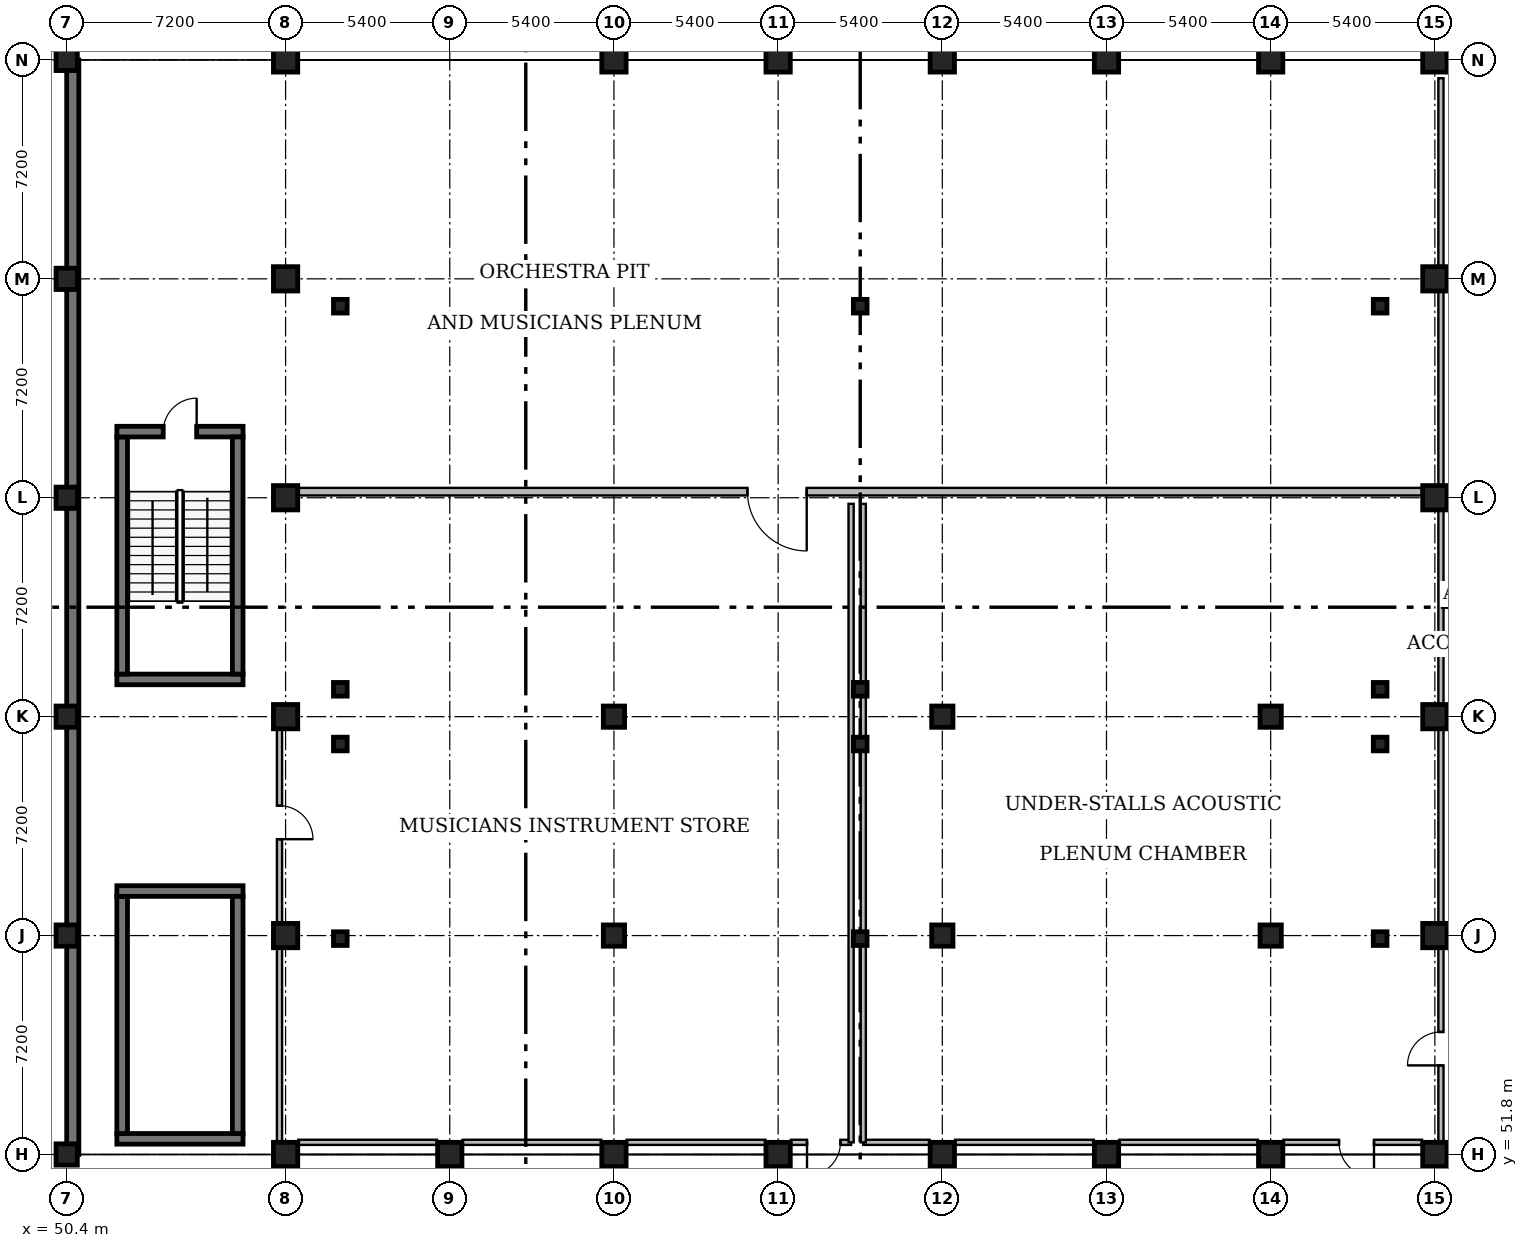
"""IFC4 building model, lengths in metres.
Left out: names, types, materials, properties, quantities, classifications, styles, units other than length and angle.
Written with IfcOpenShell. Run it as: python <this file> out.ifc"""

import sys

from ifc_helpers import new_model, si_unit, direction, frame, frame_2d, origin, origin_2d, place, context, subcontext, project, spatial, rectangle, extrude, element, fill, save


model = new_model("IFC4")
c1 = context("Model", 3, precision=1e-05, world=origin(), true_north=direction((0.0, 1.0)))
c2 = subcontext(c1, "Body", "Model", "MODEL_VIEW")
j1 = project(units=[si_unit("LENGTHUNIT", "METRE"), si_unit("PLANEANGLEUNIT", "RADIAN")], contexts=[c1])
p1 = place(None, origin())
s1 = spatial("IfcSite", under=j1, at=p1, CompositionType="ELEMENT")
p2 = place(p1, origin())
s2 = spatial("IfcBuilding", under=s1, at=p2, CompositionType="ELEMENT")
p3 = place(p2, frame((0.0, 0.0, -4.8)))
s3 = spatial("IfcBuildingStorey", under=s2, at=p3, CompositionType="ELEMENT", Elevation=-4.8)
p4 = place(p3, frame((68.4, 51.8, 0.0), z_axis=(0.0, 0.0, 1.0), x_axis=(1.0, 0.0, 0.0)))
e1 = element("IfcColumn", 1, at=p4, inside=s3, PredefinedType="COLUMN", context=c2, shape_type="SweptSolid", body=[
    extrude(rectangle(XDim=0.8, YDim=0.8, at=origin_2d()), origin(), (0.0, 0.0, 1.0), 4.8),
])
for number, where, z_axis, x_axis in (
    (2, (68.4, 59.0, 0.0), (0.0, 0.0, 1.0), (1.0, 0.0, 0.0)),
    (3, (68.4, 66.2, 0.0), (0.0, 0.0, 1.0), (1.0, 0.0, 0.0)),
):
    element("IfcColumn", number, at=place(p3, frame(where, z_axis=z_axis, x_axis=x_axis)), inside=s3, PredefinedType="COLUMN", context=c2, shape_type="SweptSolid", body=[
        extrude(rectangle(XDim=0.7, YDim=0.7, at=origin_2d()), origin(), (0.0, 0.0, 1.0), 4.8),
    ])
for number, where, z_axis, x_axis in (
    (4, (68.4, 87.8, 0.0), (0.0, 0.0, 1.0), (1.0, 0.0, 0.0)),
    (5, (73.8, 51.8, 0.0), (0.0, 0.0, 1.0), (1.0, 0.0, 0.0)),
    (6, (73.8, 87.8, 0.0), (0.0, 0.0, 1.0), (1.0, 0.0, 0.0)),
    (7, (79.2, 51.8, 0.0), (0.0, 0.0, 1.0), (1.0, 0.0, 0.0)),
):
    element("IfcColumn", number, at=place(p3, frame(where, z_axis=z_axis, x_axis=x_axis)), inside=s3, PredefinedType="COLUMN", context=c2, shape_type="SweptSolid", body=[
        extrude(rectangle(XDim=0.8, YDim=0.8, at=origin_2d()), origin(), (0.0, 0.0, 1.0), 4.8),
    ])
for number, where, z_axis, x_axis in (
    (8, (79.2, 59.0, 0.0), (0.0, 0.0, 1.0), (1.0, 0.0, 0.0)),
    (9, (79.2, 66.2, 0.0), (0.0, 0.0, 1.0), (1.0, 0.0, 0.0)),
):
    element("IfcColumn", number, at=place(p3, frame(where, z_axis=z_axis, x_axis=x_axis)), inside=s3, PredefinedType="COLUMN", context=c2, shape_type="SweptSolid", body=[
        extrude(rectangle(XDim=0.7, YDim=0.7, at=origin_2d()), origin(), (0.0, 0.0, 1.0), 4.8),
    ])
for number, where, z_axis, x_axis in (
    (10, (79.2, 87.8, 0.0), (0.0, 0.0, 1.0), (1.0, 0.0, 0.0)),
    (11, (84.6, 51.8, 0.0), (0.0, 0.0, 1.0), (1.0, 0.0, 0.0)),
    (12, (84.6, 87.8, 0.0), (0.0, 0.0, 1.0), (1.0, 0.0, 0.0)),
    (13, (90.0, 51.8, 0.0), (0.0, 0.0, 1.0), (1.0, 0.0, 0.0)),
):
    element("IfcColumn", number, at=place(p3, frame(where, z_axis=z_axis, x_axis=x_axis)), inside=s3, PredefinedType="COLUMN", context=c2, shape_type="SweptSolid", body=[
        extrude(rectangle(XDim=0.8, YDim=0.8, at=origin_2d()), origin(), (0.0, 0.0, 1.0), 4.8),
    ])
for number, where, z_axis, x_axis in (
    (14, (90.0, 59.0, 0.0), (0.0, 0.0, 1.0), (1.0, 0.0, 0.0)),
    (15, (90.0, 66.2, 0.0), (0.0, 0.0, 1.0), (1.0, 0.0, 0.0)),
):
    element("IfcColumn", number, at=place(p3, frame(where, z_axis=z_axis, x_axis=x_axis)), inside=s3, PredefinedType="COLUMN", context=c2, shape_type="SweptSolid", body=[
        extrude(rectangle(XDim=0.7, YDim=0.7, at=origin_2d()), origin(), (0.0, 0.0, 1.0), 4.8),
    ])
for number, where, z_axis, x_axis in (
    (16, (90.0, 87.8, 0.0), (0.0, 0.0, 1.0), (1.0, 0.0, 0.0)),
    (17, (95.4, 51.8, 0.0), (0.0, 0.0, 1.0), (1.0, 0.0, 0.0)),
    (18, (95.4, 59.0, 0.0), (0.0, 0.0, 1.0), (1.0, 0.0, 0.0)),
    (19, (95.4, 66.2, 0.0), (0.0, 0.0, 1.0), (1.0, 0.0, 0.0)),
    (20, (95.4, 73.4, 0.0), (0.0, 0.0, 1.0), (1.0, 0.0, 0.0)),
    (21, (95.4, 80.6, 0.0), (0.0, 0.0, 1.0), (1.0, 0.0, 0.0)),
    (22, (95.4, 87.8, 0.0), (0.0, 0.0, 1.0), (1.0, 0.0, 0.0)),
):
    element("IfcColumn", number, at=place(p3, frame(where, z_axis=z_axis, x_axis=x_axis)), inside=s3, PredefinedType="COLUMN", context=c2, shape_type="SweptSolid", body=[
        extrude(rectangle(XDim=0.8, YDim=0.8, at=origin_2d()), origin(), (0.0, 0.0, 1.0), 4.8),
    ])
for number, where, z_axis, x_axis in (
    (23, (50.4, 51.8, 0.0), (0.0, 0.0, 1.0), (1.0, 0.0, 0.0)),
    (24, (50.4, 59.0, 0.0), (0.0, 0.0, 1.0), (1.0, 0.0, 0.0)),
    (25, (50.4, 66.2, 0.0), (0.0, 0.0, 1.0), (1.0, 0.0, 0.0)),
    (26, (50.4, 73.4, 0.0), (0.0, 0.0, 1.0), (1.0, 0.0, 0.0)),
    (27, (50.4, 80.6, 0.0), (0.0, 0.0, 1.0), (1.0, 0.0, 0.0)),
    (28, (50.4, 87.8, 0.0), (0.0, 0.0, 1.0), (1.0, 0.0, 0.0)),
):
    element("IfcColumn", number, at=place(p3, frame(where, z_axis=z_axis, x_axis=x_axis)), inside=s3, PredefinedType="COLUMN", context=c2, shape_type="SweptSolid", body=[
        extrude(rectangle(XDim=0.7, YDim=0.7, at=origin_2d()), origin(), (0.0, 0.0, 1.0), 4.8),
    ])
for number, where, z_axis, x_axis in (
    (29, (57.6, 51.8, 0.0), (0.0, 0.0, 1.0), (1.0, 0.0, 0.0)),
    (30, (57.6, 59.0, 0.0), (0.0, 0.0, 1.0), (1.0, 0.0, 0.0)),
    (31, (57.6, 66.2, 0.0), (0.0, 0.0, 1.0), (1.0, 0.0, 0.0)),
    (32, (57.6, 73.4, 0.0), (0.0, 0.0, 1.0), (1.0, 0.0, 0.0)),
    (33, (57.6, 80.6, 0.0), (0.0, 0.0, 1.0), (1.0, 0.0, 0.0)),
    (34, (57.6, 87.8, 0.0), (0.0, 0.0, 1.0), (1.0, 0.0, 0.0)),
    (35, (63.0, 51.8, 0.0), (0.0, 0.0, 1.0), (1.0, 0.0, 0.0)),
):
    element("IfcColumn", number, at=place(p3, frame(where, z_axis=z_axis, x_axis=x_axis)), inside=s3, PredefinedType="COLUMN", context=c2, shape_type="SweptSolid", body=[
        extrude(rectangle(XDim=0.8, YDim=0.8, at=origin_2d()), origin(), (0.0, 0.0, 1.0), 4.8),
    ])
for number, where, z_axis, x_axis in (
    (36, (59.4, 79.7, 0.0), (0.0, 0.0, 1.0), (1.0, 0.0, 0.0)),
    (37, (76.5, 79.7, 0.0), (0.0, 0.0, 1.0), (1.0, 0.0, 0.0)),
    (38, (93.6, 79.7, 0.0), (0.0, 0.0, 1.0), (1.0, 0.0, 0.0)),
    (39, (59.4, 67.1, 0.0), (0.0, 0.0, 1.0), (1.0, 0.0, 0.0)),
    (40, (76.5, 67.1, 0.0), (0.0, 0.0, 1.0), (1.0, 0.0, 0.0)),
    (41, (93.6, 67.1, 0.0), (0.0, 0.0, 1.0), (1.0, 0.0, 0.0)),
    (42, (59.4, 65.3, 0.0), (0.0, 0.0, 1.0), (1.0, 0.0, 0.0)),
    (43, (76.5, 65.3, 0.0), (0.0, 0.0, 1.0), (1.0, 0.0, 0.0)),
    (44, (93.6, 65.3, 0.0), (0.0, 0.0, 1.0), (1.0, 0.0, 0.0)),
    (45, (59.4, 58.9, 0.0), (0.0, 0.0, 1.0), (1.0, 0.0, 0.0)),
    (46, (76.5, 58.9, 0.0), (0.0, 0.0, 1.0), (1.0, 0.0, 0.0)),
    (47, (93.6, 58.9, 0.0), (0.0, 0.0, 1.0), (1.0, 0.0, 0.0)),
):
    element("IfcColumn", number, at=place(p3, frame(where, z_axis=z_axis, x_axis=x_axis)), inside=s3, PredefinedType="COLUMN", context=c2, shape_type="SweptSolid", body=[
        extrude(rectangle(XDim=0.45, YDim=0.45, at=origin_2d()), origin(), (0.0, 0.0, 1.0), 4.8),
    ])
p5 = place(p3, frame((56.2, 52.315, 0.0), z_axis=(0.0, 0.0, 1.0), x_axis=(-1.0, 0.0, 0.0)))
e48 = element("IfcWall", 48, at=p5, inside=s3, PredefinedType="SOLIDWALL", context=c2, shape_type="SweptSolid", body=[
    extrude(rectangle(XDim=4.15, YDim=0.35, at=frame_2d((2.075, 0.0))), origin(), (0.0, 0.0, 1.0), 4.52),
])
p6 = place(p3, frame((52.225, 52.49, 0.0), z_axis=(0.0, 0.0, 1.0), x_axis=(0.0, 1.0, 0.0)))
e49 = element("IfcWall", 49, at=p6, inside=s3, PredefinedType="SOLIDWALL", context=c2, shape_type="SweptSolid", body=[
    extrude(rectangle(XDim=7.8, YDim=0.35, at=frame_2d((3.9, 0.0))), origin(), (0.0, 0.0, 1.0), 4.52),
])
p7 = place(p3, frame((52.05, 60.465, 0.0), z_axis=(0.0, 0.0, 1.0), x_axis=(1.0, 0.0, 0.0)))
e50 = element("IfcWall", 50, at=p7, inside=s3, PredefinedType="SOLIDWALL", context=c2, shape_type="SweptSolid", body=[
    extrude(rectangle(XDim=4.15, YDim=0.35, at=frame_2d((2.075, 0.0))), origin(), (0.0, 0.0, 1.0), 4.52),
])
p8 = place(p3, frame((56.025, 60.29, 0.0), z_axis=(0.0, 0.0, 1.0), x_axis=(0.0, -1.0, 0.0)))
e51 = element("IfcWall", 51, at=p8, inside=s3, PredefinedType="SOLIDWALL", context=c2, shape_type="SweptSolid", body=[
    extrude(rectangle(XDim=7.8, YDim=0.35, at=frame_2d((3.9, 0.0))), origin(), (0.0, 0.0, 1.0), 4.52),
])
p9 = place(p3, frame((56.2, 67.425, 0.0), z_axis=(0.0, 0.0, 1.0), x_axis=(-1.0, 0.0, 0.0)))
e52 = element("IfcWall", 52, at=p9, inside=s3, PredefinedType="SOLIDWALL", context=c2, shape_type="SweptSolid", body=[
    extrude(rectangle(XDim=4.15, YDim=0.35, at=frame_2d((2.075, 0.0))), origin(), (0.0, 0.0, 1.0), 4.56),
])
p10 = place(p3, frame((52.225, 67.6, 0.0), z_axis=(0.0, 0.0, 1.0), x_axis=(0.0, 1.0, 0.0)))
e53 = element("IfcWall", 53, at=p10, inside=s3, PredefinedType="SOLIDWALL", context=c2, shape_type="SweptSolid", body=[
    extrude(rectangle(XDim=7.8, YDim=0.35, at=frame_2d((3.9, 0.0))), origin(), (0.0, 0.0, 1.0), 4.56),
])
p11 = place(p3, frame((52.05, 75.575, 0.0), z_axis=(0.0, 0.0, 1.0), x_axis=(1.0, 0.0, 0.0)))
e54 = element("IfcWall", 54, at=p11, inside=s3, PredefinedType="SOLIDWALL", context=c2, shape_type="SweptSolid", body=[
    extrude(rectangle(XDim=4.15, YDim=0.35, at=frame_2d((2.075, 0.0))), origin(), (0.0, 0.0, 1.0), 4.56),
])
p12 = place(p11, frame((1.525, 0.0, 0.0)))
e55 = element("IfcOpeningElement", 55, at=p12, cuts=e54, PredefinedType="OPENING", context=c2, shape_type="SweptSolid", body=[
    extrude(rectangle(XDim=1.1, YDim=2.15, at=frame_2d((0.55, 1.075))), frame((0.0, 0.195, 0.0), z_axis=(0.0, -1.0, 0.0), x_axis=(1.0, 0.0, 0.0)), (0.0, 0.0, 1.0), 0.39),
])
p13 = place(p3, frame((56.025, 75.4, 0.0), z_axis=(0.0, 0.0, 1.0), x_axis=(0.0, -1.0, 0.0)))
e56 = element("IfcWall", 56, at=p13, inside=s3, PredefinedType="SOLIDWALL", context=c2, shape_type="SweptSolid", body=[
    extrude(rectangle(XDim=7.8, YDim=0.35, at=frame_2d((3.9, 0.0))), origin(), (0.0, 0.0, 1.0), 4.56),
])
p14 = place(p3, frame((50.6, 51.8, 0.0), z_axis=(0.0, 0.0, 1.0), x_axis=(0.0, 1.0, 0.0)))
e57 = element("IfcWall", 57, at=p14, inside=s3, PredefinedType="SOLIDWALL", context=c2, shape_type="SweptSolid", body=[
    extrude(rectangle(XDim=36.0, YDim=0.4, at=frame_2d((18.0, 0.0))), origin(), (0.0, 0.0, 1.0), 4.48),
])
p15 = place(p3, frame((94.98, 73.6, 0.0), z_axis=(0.0, 0.0, 1.0), x_axis=(-1.0, 0.0, 0.0)))
e58 = element("IfcWall", 58, at=p15, inside=s3, PredefinedType="PARTITIONING", context=c2, shape_type="SweptSolid", body=[
    extrude(rectangle(XDim=36.96, YDim=0.25, at=frame_2d((18.48, 0.0))), origin(), (0.0, 0.0, 1.0), 4.52),
])
p16 = place(p15, frame((20.24, 0.0, 0.0)))
e59 = element("IfcOpeningElement", 59, at=p16, cuts=e58, PredefinedType="OPENING", context=c2, shape_type="SweptSolid", body=[
    extrude(rectangle(XDim=1.95, YDim=2.4, at=frame_2d((0.975, 1.2))), frame((0.0, 0.145, 0.0), z_axis=(0.0, -1.0, 0.0), x_axis=(1.0, 0.0, 0.0)), (0.0, 0.0, 1.0), 0.29),
])
p17 = place(p3, frame((76.2, 52.2, 0.0), z_axis=(0.0, 0.0, 1.0), x_axis=(-1.0, 0.0, 0.0)))
e60 = element("IfcWall", 60, at=p17, inside=s3, PredefinedType="PARTITIONING", context=c2, shape_type="SweptSolid", body=[
    extrude(rectangle(XDim=1.98, YDim=0.17, at=frame_2d((0.99, 0.0))), origin(), (0.0, 0.0, 1.0), 3.84),
])
p18 = place(p17, frame((0.35, 0.0, 0.0)))
e61 = element("IfcOpeningElement", 61, at=p18, cuts=e60, PredefinedType="OPENING", context=c2, shape_type="SweptSolid", body=[
    extrude(rectangle(XDim=1.1, YDim=2.1, at=frame_2d((0.55, 1.05))), frame((0.0, 0.105, 0.0), z_axis=(0.0, -1.0, 0.0), x_axis=(1.0, 0.0, 0.0)), (0.0, 0.0, 1.0), 0.21),
])
p19 = place(p3, frame((73.38, 52.2, 0.0), z_axis=(0.0, 0.0, 1.0), x_axis=(-1.0, 0.0, 0.0)))
e62 = element("IfcWall", 62, at=p19, inside=s3, PredefinedType="PARTITIONING", context=c2, shape_type="SweptSolid", body=[
    extrude(rectangle(XDim=4.56, YDim=0.17, at=frame_2d((2.28, 0.0))), origin(), (0.0, 0.0, 1.0), 3.84),
])
for number, where, z_axis, x_axis in (
    (63, (67.98, 52.2, 0.0), (0.0, 0.0, 1.0), (-1.0, 0.0, 0.0)),
    (64, (62.58, 52.2, 0.0), (0.0, 0.0, 1.0), (-1.0, 0.0, 0.0)),
):
    element("IfcWall", number, at=place(p3, frame(where, z_axis=z_axis, x_axis=x_axis)), inside=s3, PredefinedType="PARTITIONING", context=c2, shape_type="SweptSolid", body=[
        extrude(rectangle(XDim=4.56, YDim=0.17, at=frame_2d((2.28, 0.0))), origin(), (0.0, 0.0, 1.0), 3.84),
    ])
p20 = place(p3, frame((76.2, 73.2, 0.0), z_axis=(0.0, 0.0, 1.0), x_axis=(0.0, -1.0, 0.0)))
e65 = element("IfcWall", 65, at=p20, inside=s3, PredefinedType="PARTITIONING", context=c2, shape_type="SweptSolid", body=[
    extrude(rectangle(XDim=21.0, YDim=0.17, at=frame_2d((10.5, 0.0))), origin(), (0.0, 0.0, 1.0), 4.04),
])
p21 = place(p3, frame((94.98, 52.2, 0.0), z_axis=(0.0, 0.0, 1.0), x_axis=(-1.0, 0.0, 0.0)))
e66 = element("IfcWall", 66, at=p21, inside=s3, PredefinedType="PARTITIONING", context=c2, shape_type="SweptSolid", body=[
    extrude(rectangle(XDim=4.56, YDim=0.17, at=frame_2d((2.28, 0.0))), origin(), (0.0, 0.0, 1.0), 3.84),
])
p22 = place(p21, frame((1.582, 0.0, 0.0)))
e67 = element("IfcOpeningElement", 67, at=p22, cuts=e66, PredefinedType="OPENING", context=c2, shape_type="SweptSolid", body=[
    extrude(rectangle(XDim=1.15, YDim=2.15, at=frame_2d((0.575, 1.075))), frame((0.0, 0.105, 0.0), z_axis=(0.0, -1.0, 0.0), x_axis=(1.0, 0.0, 0.0)), (0.0, 0.0, 1.0), 0.21),
])
p23 = place(p3, frame((89.58, 52.2, 0.0), z_axis=(0.0, 0.0, 1.0), x_axis=(-1.0, 0.0, 0.0)))
e68 = element("IfcWall", 68, at=p23, inside=s3, PredefinedType="PARTITIONING", context=c2, shape_type="SweptSolid", body=[
    extrude(rectangle(XDim=4.56, YDim=0.17, at=frame_2d((2.28, 0.0))), origin(), (0.0, 0.0, 1.0), 3.84),
])
p24 = place(p3, frame((84.18, 52.2, 0.0), z_axis=(0.0, 0.0, 1.0), x_axis=(-1.0, 0.0, 0.0)))
e69 = element("IfcWall", 69, at=p24, inside=s3, PredefinedType="PARTITIONING", context=c2, shape_type="SweptSolid", body=[
    extrude(rectangle(XDim=4.56, YDim=0.17, at=frame_2d((2.28, 0.0))), origin(), (0.0, 0.0, 1.0), 3.84),
])
p25 = place(p3, frame((78.78, 52.2, 0.0), z_axis=(0.0, 0.0, 1.0), x_axis=(-1.0, 0.0, 0.0)))
e70 = element("IfcWall", 70, at=p25, inside=s3, PredefinedType="PARTITIONING", context=c2, shape_type="SweptSolid", body=[
    extrude(rectangle(XDim=2.18, YDim=0.17, at=frame_2d((1.09, 0.0))), origin(), (0.0, 0.0, 1.0), 3.84),
])
p26 = place(p3, frame((76.6, 52.2, 0.0), z_axis=(0.0, 0.0, 1.0), x_axis=(0.0, 1.0, 0.0)))
e71 = element("IfcWall", 71, at=p26, inside=s3, PredefinedType="PARTITIONING", context=c2, shape_type="SweptSolid", body=[
    extrude(rectangle(XDim=21.0, YDim=0.17, at=frame_2d((10.5, 0.0))), origin(), (0.0, 0.0, 1.0), 4.04),
])
p27 = place(p3, frame((57.4, 65.78, 0.0), z_axis=(0.0, 0.0, 1.0), x_axis=(0.0, -1.0, 0.0)))
e72 = element("IfcWall", 72, at=p27, inside=s3, PredefinedType="PARTITIONING", context=c2, shape_type="SweptSolid", body=[
    extrude(rectangle(XDim=6.36, YDim=0.17, at=frame_2d((3.18, 0.0))), origin(), (0.0, 0.0, 1.0), 3.84),
])
p28 = place(p27, frame((2.51, 0.0, 0.0)))
e73 = element("IfcOpeningElement", 73, at=p28, cuts=e72, PredefinedType="OPENING", context=c2, shape_type="SweptSolid", body=[
    extrude(rectangle(XDim=1.1, YDim=2.1, at=frame_2d((0.55, 1.05))), frame((0.0, 0.105, 0.0), z_axis=(0.0, -1.0, 0.0), x_axis=(1.0, 0.0, 0.0)), (0.0, 0.0, 1.0), 0.21),
])
p29 = place(p3, frame((57.4, 58.58, 0.0), z_axis=(0.0, 0.0, 1.0), x_axis=(0.0, -1.0, 0.0)))
e74 = element("IfcWall", 74, at=p29, inside=s3, PredefinedType="PARTITIONING", context=c2, shape_type="SweptSolid", body=[
    extrude(rectangle(XDim=6.36, YDim=0.17, at=frame_2d((3.18, 0.0))), origin(), (0.0, 0.0, 1.0), 3.84),
])
p30 = place(p3, frame((95.6, 52.22, 0.0), z_axis=(0.0, 0.0, 1.0), x_axis=(0.0, 1.0, 0.0)))
e75 = element("IfcWall", 75, at=p30, inside=s3, PredefinedType="PARTITIONING", context=c2, shape_type="SweptSolid", body=[
    extrude(rectangle(XDim=6.36, YDim=0.17, at=frame_2d((3.18, 0.0))), origin(), (0.0, 0.0, 1.0), 3.84),
])
p31 = place(p30, frame((2.51, 0.0, 0.0)))
e76 = element("IfcOpeningElement", 76, at=p31, cuts=e75, PredefinedType="OPENING", context=c2, shape_type="SweptSolid", body=[
    extrude(rectangle(XDim=1.1, YDim=2.1, at=frame_2d((0.55, 1.05))), frame((0.0, 0.105, 0.0), z_axis=(0.0, -1.0, 0.0), x_axis=(1.0, 0.0, 0.0)), (0.0, 0.0, 1.0), 0.21),
])
p32 = place(p3, frame((95.6, 59.42, 0.0), z_axis=(0.0, 0.0, 1.0), x_axis=(0.0, 1.0, 0.0)))
e77 = element("IfcWall", 77, at=p32, inside=s3, PredefinedType="PARTITIONING", context=c2, shape_type="SweptSolid", body=[
    extrude(rectangle(XDim=6.36, YDim=0.17, at=frame_2d((3.18, 0.0))), origin(), (0.0, 0.0, 1.0), 3.84),
])
for number, where, z_axis, x_axis in (
    (78, (95.6, 66.62, 0.0), (0.0, 0.0, 1.0), (0.0, 1.0, 0.0)),
    (79, (95.6, 73.82, 0.0), (0.0, 0.0, 1.0), (0.0, 1.0, 0.0)),
):
    element("IfcWall", number, at=place(p3, frame(where, z_axis=z_axis, x_axis=x_axis)), inside=s3, PredefinedType="PARTITIONING", context=c2, shape_type="SweptSolid", body=[
        extrude(rectangle(XDim=6.36, YDim=0.17, at=frame_2d((3.18, 0.0))), origin(), (0.0, 0.0, 1.0), 3.84),
    ])
p33 = place(p3, frame((95.6, 81.02, 0.0), z_axis=(0.0, 0.0, 1.0), x_axis=(0.0, 1.0, 0.0)))
e80 = element("IfcWall", 80, at=p33, inside=s3, PredefinedType="PARTITIONING", context=c2, shape_type="SweptSolid", body=[
    extrude(rectangle(XDim=6.18, YDim=0.17, at=frame_2d((3.09, 0.0))), origin(), (0.0, 0.0, 1.0), 3.8),
])
p34 = place(p12, origin())
e81 = element("IfcDoor", 81, at=p34, inside=s3, OperationType="SINGLE_SWING_RIGHT", PredefinedType="DOOR", context=c2, shape_type="SweptSolid", body=[
    extrude(rectangle(XDim=1.1, YDim=2.15, at=frame_2d((0.55, 1.075))), frame((0.0, 0.025, 0.0), z_axis=(0.0, -1.0, 0.0), x_axis=(1.0, 0.0, 0.0)), (0.0, 0.0, 1.0), 0.05),
])
fill(e55, e81)
p35 = place(p16, origin())
e82 = element("IfcDoor", 82, at=p35, inside=s3, OperationType="DOUBLE_DOOR_SINGLE_SWING", PredefinedType="DOOR", context=c2, shape_type="SweptSolid", body=[
    extrude(rectangle(XDim=1.95, YDim=2.4, at=frame_2d((0.975, 1.2))), frame((0.0, 0.025, 0.0), z_axis=(0.0, -1.0, 0.0), x_axis=(1.0, 0.0, 0.0)), (0.0, 0.0, 1.0), 0.05),
])
fill(e59, e82)
p36 = place(p18, origin())
e83 = element("IfcDoor", 83, at=p36, inside=s3, OperationType="SINGLE_SWING_RIGHT", PredefinedType="DOOR", context=c2, shape_type="SweptSolid", body=[
    extrude(rectangle(XDim=1.1, YDim=2.1, at=frame_2d((0.55, 1.05))), frame((0.0, 0.025, 0.0), z_axis=(0.0, -1.0, 0.0), x_axis=(1.0, 0.0, 0.0)), (0.0, 0.0, 1.0), 0.05),
])
fill(e61, e83)
p37 = place(p22, origin())
e84 = element("IfcDoor", 84, at=p37, inside=s3, OperationType="SINGLE_SWING_LEFT", PredefinedType="DOOR", context=c2, shape_type="SweptSolid", body=[
    extrude(rectangle(XDim=1.15, YDim=2.15, at=frame_2d((0.575, 1.075))), frame((0.0, 0.025, 0.0), z_axis=(0.0, -1.0, 0.0), x_axis=(1.0, 0.0, 0.0)), (0.0, 0.0, 1.0), 0.05),
])
fill(e67, e84)
p38 = place(p28, origin())
e85 = element("IfcDoor", 85, at=p38, inside=s3, OperationType="SINGLE_SWING_RIGHT", PredefinedType="DOOR", context=c2, shape_type="SweptSolid", body=[
    extrude(rectangle(XDim=1.1, YDim=2.1, at=frame_2d((0.55, 1.05))), frame((0.0, 0.025, 0.0), z_axis=(0.0, -1.0, 0.0), x_axis=(1.0, 0.0, 0.0)), (0.0, 0.0, 1.0), 0.05),
])
fill(e73, e85)
p39 = place(p31, origin())
e86 = element("IfcDoor", 86, at=p39, inside=s3, OperationType="SINGLE_SWING_LEFT", PredefinedType="DOOR", context=c2, shape_type="SweptSolid", body=[
    extrude(rectangle(XDim=1.1, YDim=2.1, at=frame_2d((0.55, 1.05))), frame((0.0, 0.025, 0.0), z_axis=(0.0, -1.0, 0.0), x_axis=(1.0, 0.0, 0.0)), (0.0, 0.0, 1.0), 0.05),
])
fill(e76, e86)
save(model, sys.argv[1])
